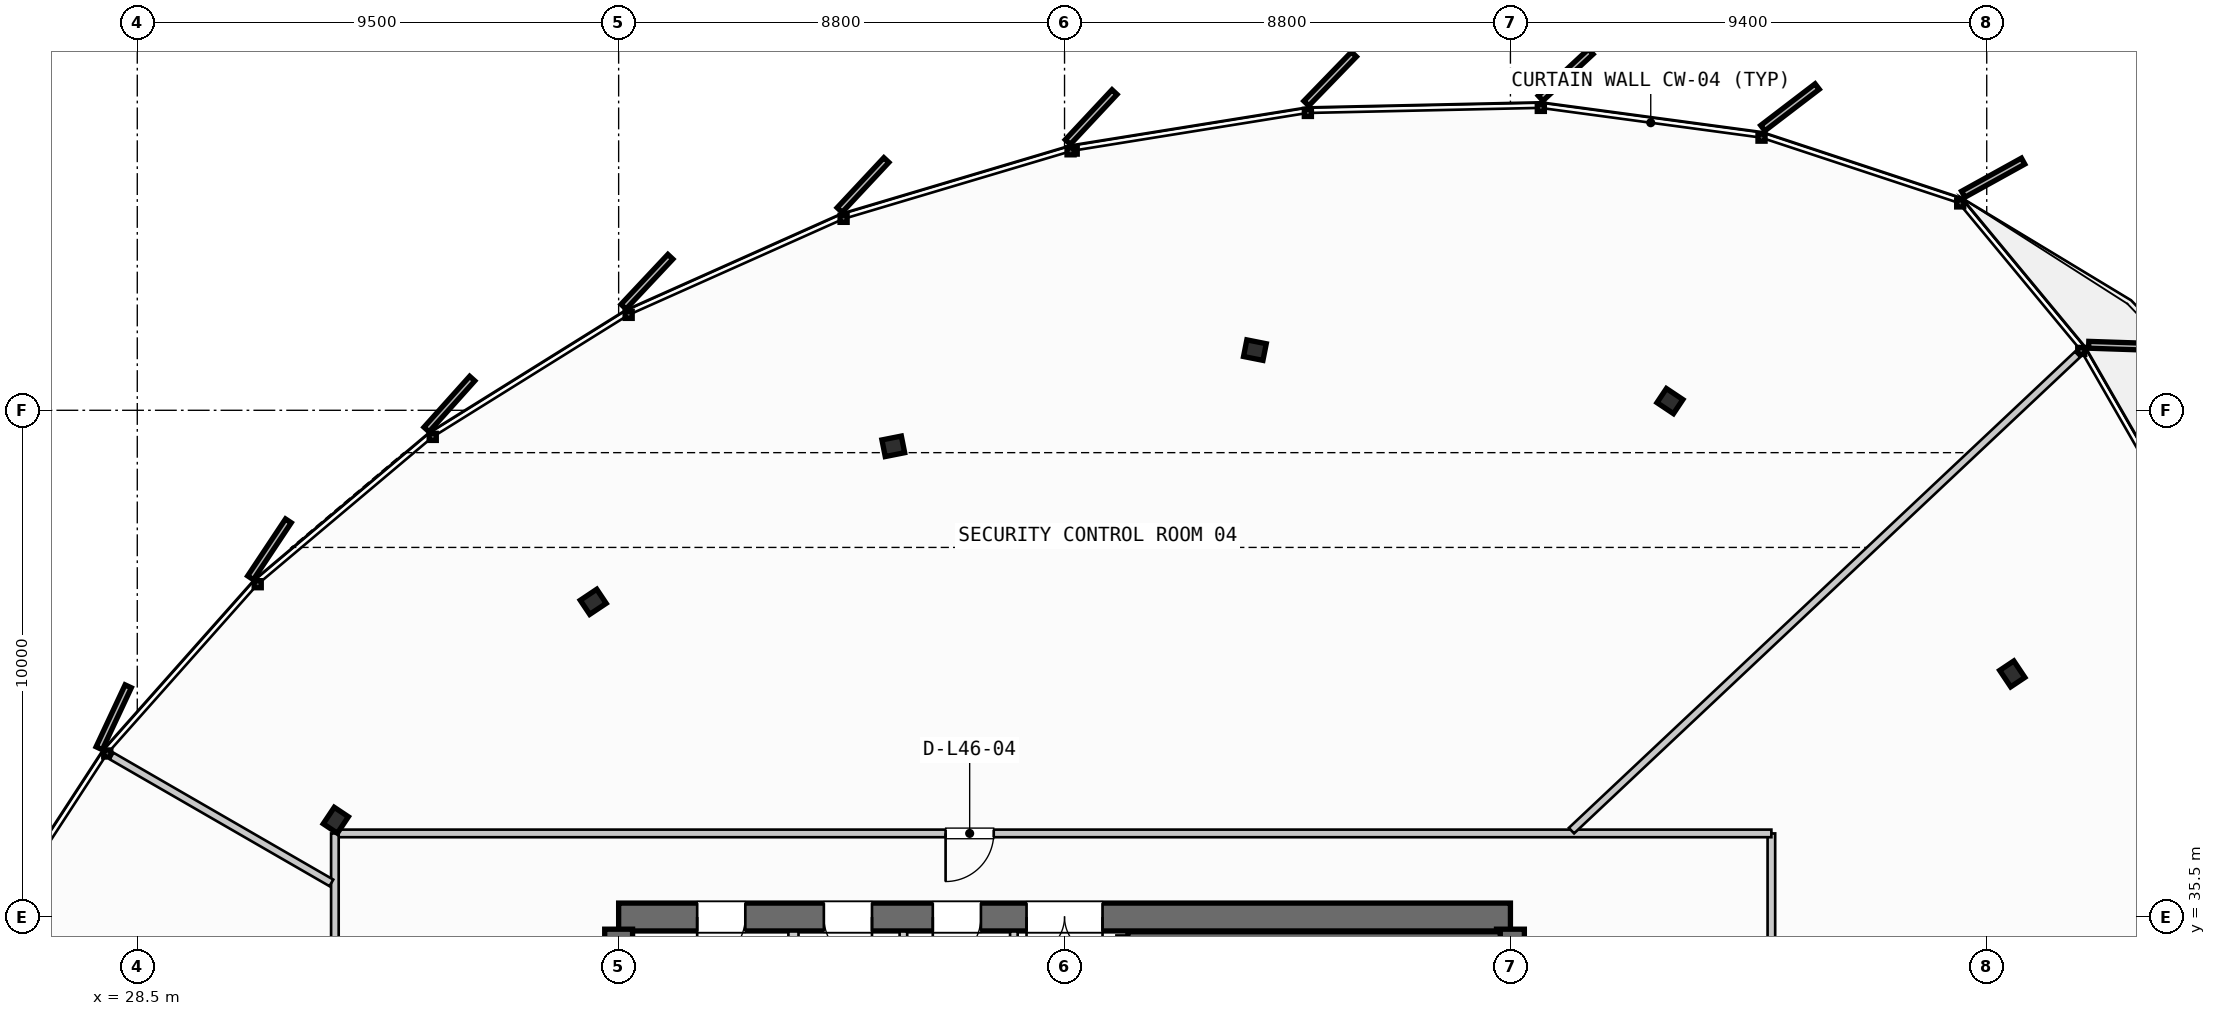
"""IFC4 building model, lengths in metres.
Left out: names, types, materials, properties, quantities, classifications, styles, units other than length and angle.
Written with IfcOpenShell. Run it as: python <this file> out.ifc"""

import sys

from ifc_helpers import new_model, si_unit, direction, frame, frame_2d, origin, origin_2d, place, context, subcontext, project, spatial, rectangle, i_section, extrude, source, transform, mapped, element, fill, save


model = new_model("IFC4")
c1 = context("Model", 3, precision=1e-05, world=origin(), true_north=direction((0.0, 1.0)))
c2 = subcontext(c1, "Body", "Model", "MODEL_VIEW")
j1 = project(units=[si_unit("LENGTHUNIT", "METRE"), si_unit("PLANEANGLEUNIT", "RADIAN")], contexts=[c1])
p1 = place(None, origin())
s1 = spatial("IfcSite", under=j1, at=p1, CompositionType="ELEMENT")
p2 = place(p1, origin())
s2 = spatial("IfcBuilding", under=s1, at=p2, CompositionType="ELEMENT")
p3 = place(p2, frame((0.0, 0.0, 179.9)))
s3 = spatial("IfcBuildingStorey", under=s2, at=p3, CompositionType="ELEMENT", Elevation=179.9)
p4 = place(p3, frame((55.6, 35.5, 0.0), z_axis=(0.0, 0.0, 1.0), x_axis=(-1.0, 0.0, 0.0)))
e1 = element("IfcWall", 1, at=p4, inside=s3, PredefinedType="SHEAR", context=c2, shape_type="SweptSolid", body=[
    extrude(rectangle(XDim=17.6, YDim=0.55, at=frame_2d((8.8, 0.0))), origin(), (0.0, 0.0, 1.0), 3.26),
])
p5 = place(p4, frame((8.05, 0.0, 0.0)))
e2 = element("IfcOpeningElement", 2, at=p5, cuts=e1, PredefinedType="OPENING", context=c2, shape_type="SweptSolid", body=[
    extrude(rectangle(XDim=1.5, YDim=2.2, at=frame_2d((0.75, 1.1))), frame((0.0, 0.285, 0.0), z_axis=(0.0, -1.0, 0.0), x_axis=(1.0, 0.0, 0.0)), (0.0, 0.0, 1.0), 0.57),
])
p6 = place(p4, frame((15.1, 0.0, 0.0)))
e3 = element("IfcOpeningElement", 3, at=p6, cuts=e1, PredefinedType="OPENING", context=c2, shape_type="SweptSolid", body=[
    extrude(rectangle(XDim=0.95, YDim=2.15, at=frame_2d((0.475, 1.075))), frame((0.0, 0.285, 0.0), z_axis=(0.0, -1.0, 0.0), x_axis=(1.0, 0.0, 0.0)), (0.0, 0.0, 1.0), 0.57),
])
p7 = place(p4, frame((12.6, 0.0, 0.0)))
e4 = element("IfcOpeningElement", 4, at=p7, cuts=e1, PredefinedType="OPENING", context=c2, shape_type="SweptSolid", body=[
    extrude(rectangle(XDim=0.95, YDim=2.15, at=frame_2d((0.475, 1.075))), frame((0.0, 0.285, 0.0), z_axis=(0.0, -1.0, 0.0), x_axis=(1.0, 0.0, 0.0)), (0.0, 0.0, 1.0), 0.57),
])
p8 = place(p4, frame((10.45, 0.0, 0.0)))
e5 = element("IfcOpeningElement", 5, at=p8, cuts=e1, PredefinedType="OPENING", context=c2, shape_type="SweptSolid", body=[
    extrude(rectangle(XDim=0.95, YDim=2.15, at=frame_2d((0.475, 1.075))), frame((0.0, 0.285, 0.0), z_axis=(0.0, -1.0, 0.0), x_axis=(1.0, 0.0, 0.0)), (0.0, 0.0, 1.0), 0.57),
])
p9 = place(p3, frame((38.0, 35.26, 0.0), z_axis=(0.0, 0.0, 1.0), x_axis=(0.0, -1.0, 0.0)))
e6 = element("IfcWall", 6, at=p9, inside=s3, PredefinedType="SHEAR", context=c2, shape_type="SweptSolid", body=[
    extrude(rectangle(XDim=14.92, YDim=0.55, at=frame_2d((7.46, 0.0))), origin(), (0.0, 0.0, 1.0), 3.26),
])
p10 = place(p9, frame((5.21, 0.0, 0.0)))
e7 = element("IfcOpeningElement", 7, at=p10, cuts=e6, PredefinedType="OPENING", context=c2, shape_type="SweptSolid", body=[
    extrude(rectangle(XDim=1.1, YDim=2.2, at=frame_2d((0.55, 1.1))), frame((0.0, 0.285, 0.0), z_axis=(0.0, -1.0, 0.0), x_axis=(1.0, 0.0, 0.0)), (0.0, 0.0, 1.0), 0.57),
])
p11 = place(p3, frame((55.6, 20.34, 0.0), z_axis=(0.0, 0.0, 1.0), x_axis=(0.0, 1.0, 0.0)))
e8 = element("IfcWall", 8, at=p11, inside=s3, PredefinedType="SHEAR", context=c2, shape_type="SweptSolid", body=[
    extrude(rectangle(XDim=14.92, YDim=0.55, at=frame_2d((7.46, 0.0))), origin(), (0.0, 0.0, 1.0), 3.26),
])
p12 = place(p11, frame((12.71, 0.0, 0.0)))
e9 = element("IfcOpeningElement", 9, at=p12, cuts=e8, PredefinedType="OPENING", context=c2, shape_type="SweptSolid", body=[
    extrude(rectangle(XDim=1.05, YDim=2.15, at=frame_2d((0.525, 1.075))), frame((0.0, 0.285, 0.0), z_axis=(0.0, -1.0, 0.0), x_axis=(1.0, 0.0, 0.0)), (0.0, 0.0, 1.0), 0.57),
])
p13 = place(p11, frame((8.61, 0.0, 0.0)))
e10 = element("IfcOpeningElement", 10, at=p13, cuts=e8, PredefinedType="OPENING", context=c2, shape_type="SweptSolid", body=[
    extrude(rectangle(XDim=1.1, YDim=2.2, at=frame_2d((0.55, 1.1))), frame((0.0, 0.285, 0.0), z_axis=(0.0, -1.0, 0.0), x_axis=(1.0, 0.0, 0.0)), (0.0, 0.0, 1.0), 0.57),
])
m1 = source(origin(), c2, "Body", "SweptSolid", [
    extrude(i_section(OverallWidth=0.391, OverallDepth=0.335, WebThickness=0.023, FlangeThickness=0.034, FilletRadius=0.015, at=origin_2d()), origin(), (0.0, 0.0, 1.0), 3.26),
])
for number, where, z_axis, x_axis in (
    (11, (65.504, 40.298, 0.0), (0.0, 0.0, 1.0), (0.831, 0.556, 0.0)),
    (12, (58.748, 45.681, 0.0), (0.0, 0.0, 1.0), (0.556, 0.831, 0.0)),
    (13, (50.557, 46.688, 0.0), (0.0, 0.0, 1.0), (0.195, 0.981, 0.0)),
    (14, (43.421, 44.789, 0.0), (0.0, 0.0, 1.0), (-0.195, 0.981, 0.0)),
    (15, (37.499, 41.72, 0.0), (0.0, 0.0, 1.0), (-0.556, 0.831, 0.0)),
    (16, (32.418, 37.409, 0.0), (0.0, 0.0, 1.0), (-0.831, 0.556, 0.0)),
):
    element("IfcColumn", number, at=place(p3, frame(where, z_axis=z_axis, x_axis=x_axis)), inside=s3, PredefinedType="COLUMN", context=c2, shape_type="MappedRepresentation", body=[
        mapped(m1, transform((0.0, 0.0, 0.0), scale=1.0)),
    ])
p14 = place(p3, frame((48.05, 35.11, 0.0), z_axis=(0.0, 0.0, 1.0), x_axis=(1.0, 0.0, 0.0)))
e17 = element("IfcWall", 17, at=p14, inside=s3, PredefinedType="SHEAR", context=c2, shape_type="SweptSolid", body=[
    extrude(rectangle(XDim=7.35, YDim=0.2, at=frame_2d((3.675, 0.0))), origin(), (0.0, 0.0, 1.0), 3.26),
])
p15 = place(p3, frame((41.45, 31.85, 0.0), z_axis=(0.0, 0.0, 1.0), x_axis=(0.0, 1.0, 0.0)))
e18 = element("IfcWall", 18, at=p15, inside=s3, PredefinedType="PARTITIONING", context=c2, shape_type="SweptSolid", body=[
    extrude(rectangle(XDim=3.365, YDim=0.2, at=frame_2d((1.683, 0.0))), origin(), (0.0, 0.0, 1.0), 2.28),
])
p16 = place(p3, frame((45.8, 31.85, 0.0), z_axis=(0.0, 0.0, 1.0), x_axis=(0.0, 1.0, 0.0)))
e19 = element("IfcWall", 19, at=p16, inside=s3, PredefinedType="PARTITIONING", context=c2, shape_type="SweptSolid", body=[
    extrude(rectangle(XDim=3.365, YDim=0.15, at=frame_2d((1.683, 0.0))), origin(), (0.0, 0.0, 1.0), 2.28),
])
p17 = place(p3, frame((43.62, 31.85, 0.0), z_axis=(0.0, 0.0, 1.0), x_axis=(0.0, 1.0, 0.0)))
e20 = element("IfcWall", 20, at=p17, inside=s3, PredefinedType="PLUMBINGWALL", context=c2, shape_type="SweptSolid", body=[
    extrude(rectangle(XDim=3.365, YDim=0.15, at=frame_2d((1.683, 0.0))), origin(), (0.0, 0.0, 1.0), 2.28),
])
p18 = place(p3, frame((60.75, 34.5, 0.0), z_axis=(0.0, 0.0, 1.0), x_axis=(0.0, 1.0, 0.0)))
e21 = element("IfcWall", 21, at=p18, inside=s3, PredefinedType="PARTITIONING", context=c2, shape_type="SweptSolid", body=[
    extrude(rectangle(XDim=2.65, YDim=0.15, at=frame_2d((1.325, 0.0))), origin(), (0.0, 0.0, 1.0), 2.28),
])
p19 = place(p3, frame((60.75, 37.15, 0.0), z_axis=(0.0, 0.0, 1.0), x_axis=(-1.0, 0.0, 0.0)))
e22 = element("IfcWall", 22, at=p19, inside=s3, PredefinedType="PARTITIONING", context=c2, shape_type="SweptSolid", body=[
    extrude(rectangle(XDim=28.35, YDim=0.15, at=frame_2d((14.175, 0.0))), origin(), (0.0, 0.0, 1.0), 2.28),
])
p20 = place(p19, frame((15.347, 0.0, 0.0)))
e23 = element("IfcOpeningElement", 23, at=p20, cuts=e22, PredefinedType="OPENING", context=c2, shape_type="SweptSolid", body=[
    extrude(rectangle(XDim=0.95, YDim=2.15, at=frame_2d((0.475, 1.075))), frame((0.0, 0.085, 0.0), z_axis=(0.0, -1.0, 0.0), x_axis=(1.0, 0.0, 0.0)), (0.0, 0.0, 1.0), 0.17),
])
p21 = place(p3, frame((32.4, 37.15, 0.0), z_axis=(0.0, 0.0, 1.0), x_axis=(0.0, -1.0, 0.0)))
e24 = element("IfcWall", 24, at=p21, inside=s3, PredefinedType="PARTITIONING", context=c2, shape_type="SweptSolid", body=[
    extrude(rectangle(XDim=2.65, YDim=0.15, at=frame_2d((1.325, 0.0))), origin(), (0.0, 0.0, 1.0), 2.28),
])
p22 = place(p3, frame((56.805, 37.205, 0.0), z_axis=(0.0, 0.0, 1.0), x_axis=(0.728284128677, 0.685275293526, 0.0)))
e25 = element("IfcWall", 25, at=p22, inside=s3, PredefinedType="PARTITIONING", context=c2, shape_type="SweptSolid", body=[
    extrude(rectangle(XDim=13.715, YDim=0.15, at=frame_2d((6.857, 0.0))), origin(), (0.0, 0.0, 1.0), 2.28),
])
p23 = place(p3, frame((32.331, 36.174, 0.0), z_axis=(0.0, 0.0, 1.0), x_axis=(-0.866065421185, 0.499930681422, 0.0)))
e26 = element("IfcWall", 26, at=p23, inside=s3, PredefinedType="PARTITIONING", context=c2, shape_type="SweptSolid", body=[
    extrude(rectangle(XDim=5.007, YDim=0.15, at=frame_2d((2.503, 0.0))), origin(), (0.0, 0.0, 1.0), 2.28),
])
m2 = source(origin(), c2, "Body", "SweptSolid", [
    extrude(rectangle(XDim=1.5, YDim=2.2, at=frame_2d((0.75, 1.1))), frame((0.0, 0.025, 0.0), z_axis=(0.0, -1.0, 0.0), x_axis=(1.0, 0.0, 0.0)), (0.0, 0.0, 1.0), 0.05),
])
p24 = place(p5, origin())
e27 = element("IfcDoor", 27, at=p24, inside=s3, OperationType="DOUBLE_DOOR_SINGLE_SWING", PredefinedType="DOOR", context=c2, shape_type="MappedRepresentation", body=[
    mapped(m2, transform((0.0, 0.0, 0.0), scale=1.0)),
])
fill(e2, e27)
m3 = source(origin(), c2, "Body", "SweptSolid", [
    extrude(rectangle(XDim=0.95, YDim=2.15, at=frame_2d((0.475, 1.075))), frame((0.0, 0.025, 0.0), z_axis=(0.0, -1.0, 0.0), x_axis=(1.0, 0.0, 0.0)), (0.0, 0.0, 1.0), 0.05),
])
p25 = place(p6, origin())
e28 = element("IfcDoor", 28, at=p25, inside=s3, OperationType="SINGLE_SWING_RIGHT", PredefinedType="DOOR", context=c2, shape_type="MappedRepresentation", body=[
    mapped(m3, transform((0.0, 0.0, 0.0), scale=1.0)),
])
fill(e3, e28)
p26 = place(p7, origin())
e29 = element("IfcDoor", 29, at=p26, inside=s3, OperationType="SINGLE_SWING_LEFT", PredefinedType="DOOR", context=c2, shape_type="MappedRepresentation", body=[
    mapped(m3, transform((0.0, 0.0, 0.0), scale=1.0)),
])
fill(e4, e29)
p27 = place(p8, origin())
e30 = element("IfcDoor", 30, at=p27, inside=s3, OperationType="SINGLE_SWING_RIGHT", PredefinedType="DOOR", context=c2, shape_type="MappedRepresentation", body=[
    mapped(m3, transform((0.0, 0.0, 0.0), scale=1.0)),
])
fill(e5, e30)
p28 = place(p20, origin())
e31 = element("IfcDoor", 31, at=p28, inside=s3, OperationType="SINGLE_SWING_RIGHT", PredefinedType="DOOR", context=c2, shape_type="MappedRepresentation", body=[
    mapped(m3, transform((0.0, 0.0, 0.0), scale=1.0)),
])
fill(e23, e31)
save(model, sys.argv[1])
